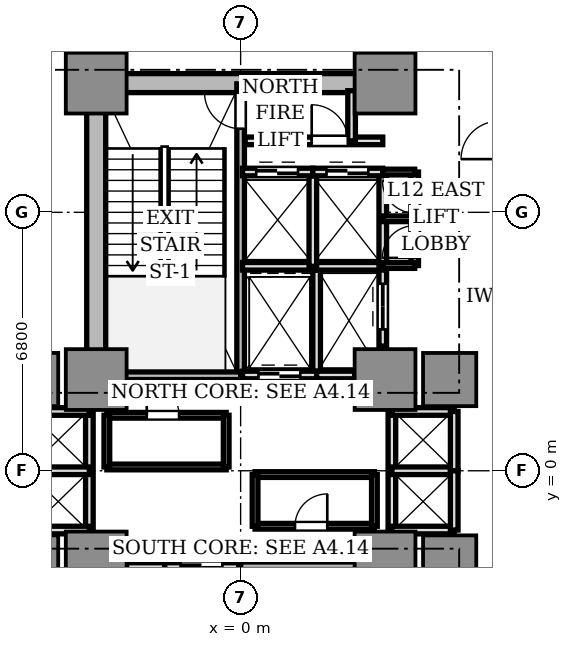
"""IFC4 building model, lengths in metres.
Left out: names, types, materials, properties, quantities, classifications, styles, units other than length and angle.
Written with IfcOpenShell. Run it as: python <this file> out.ifc"""

import sys

from ifc_helpers import new_model, si_unit, direction, frame, frame_2d, origin, origin_2d, place, context, subcontext, project, spatial, rectangle, extrude, source, transform, mapped, element, fill, save


model = new_model("IFC4")
c1 = context("Model", 3, precision=1e-05, world=origin(), true_north=direction((0.0, 1.0)))
c2 = subcontext(c1, "Body", "Model", "MODEL_VIEW")
j1 = project(units=[si_unit("LENGTHUNIT", "METRE"), si_unit("PLANEANGLEUNIT", "RADIAN")], contexts=[c1])
p1 = place(None, origin())
s1 = spatial("IfcSite", under=j1, at=p1, CompositionType="ELEMENT")
p2 = place(p1, origin())
s2 = spatial("IfcBuilding", under=s1, at=p2, CompositionType="ELEMENT")
p3 = place(p2, frame((0.0, 0.0, 46.55)))
s3 = spatial("IfcBuildingStorey", under=s2, at=p3, CompositionType="ELEMENT", Elevation=46.55)
p4 = place(p3, frame((-3.55, 10.2, 0.0), z_axis=(0.0, 0.0, 1.0), x_axis=(1.0, 0.0, 0.0)))
e1 = element("IfcWall", 1, at=p4, inside=s3, PredefinedType="SHEAR", context=c2, shape_type="SweptSolid", body=[
    extrude(rectangle(XDim=7.1, YDim=0.5, at=frame_2d((3.55, 0.0))), origin(), (0.0, 0.0, 1.0), 4.26),
])
p5 = place(p3, frame((-3.8, 2.85, 0.0), z_axis=(0.0, 0.0, 1.0), x_axis=(0.0, 1.0, 0.0)))
e2 = element("IfcWall", 2, at=p5, inside=s3, PredefinedType="SHEAR", context=c2, shape_type="SweptSolid", body=[
    extrude(rectangle(XDim=6.9, YDim=0.5, at=frame_2d((3.45, 0.0))), origin(), (0.0, 0.0, 1.0), 4.26),
])
m1 = source(origin(), c2, "Body", "SweptSolid", [
    extrude(rectangle(XDim=1.6, YDim=1.6, at=origin_2d()), origin(), (0.0, 0.0, 1.0), 4.26),
])
for number, where, z_axis, x_axis in (
    (3, (-3.8, 2.4, 0.0), (0.0, 0.0, 1.0), (1.0, 0.0, 0.0)),
    (4, (3.8, 2.4, 0.0), (0.0, 0.0, 1.0), (1.0, 0.0, 0.0)),
    (5, (-3.8, 10.2, 0.0), (0.0, 0.0, 1.0), (1.0, 0.0, 0.0)),
    (6, (3.8, 10.2, 0.0), (0.0, 0.0, 1.0), (1.0, 0.0, 0.0)),
    (7, (-3.8, -2.4, 0.0), (0.0, 0.0, 1.0), (1.0, 0.0, 0.0)),
    (8, (3.8, -2.4, 0.0), (0.0, 0.0, 1.0), (1.0, 0.0, 0.0)),
):
    element("IfcColumn", number, at=place(p3, frame(where, z_axis=z_axis, x_axis=x_axis)), inside=s3, PredefinedType="COLUMN", context=c2, shape_type="MappedRepresentation", body=[
        mapped(m1, transform((0.0, 0.0, 0.0), scale=1.0)),
    ])
m2 = source(origin(), c2, "Body", "SweptSolid", [
    extrude(rectangle(XDim=1.4, YDim=1.4, at=origin_2d()), origin(), (0.0, 0.0, 1.0), 4.26),
])
for number, where, z_axis, x_axis in (
    (9, (5.5, 2.4, 0.0), (0.0, 0.0, 1.0), (1.0, 0.0, 0.0)),
    (10, (-5.5, 2.4, 0.0), (0.0, 0.0, 1.0), (1.0, 0.0, 0.0)),
    (11, (5.5, -2.4, 0.0), (0.0, 0.0, 1.0), (1.0, 0.0, 0.0)),
    (12, (-5.5, -2.4, 0.0), (0.0, 0.0, 1.0), (1.0, 0.0, 0.0)),
):
    element("IfcColumn", number, at=place(p3, frame(where, z_axis=z_axis, x_axis=x_axis)), inside=s3, PredefinedType="COLUMN", context=c2, shape_type="MappedRepresentation", body=[
        mapped(m2, transform((0.0, 0.0, 0.0), scale=1.0)),
    ])
p6 = place(p3, frame((0.0, 2.5, 0.0), z_axis=(0.0, 0.0, 1.0), x_axis=(0.0, 1.0, 0.0)))
e13 = element("IfcWall", 13, at=p6, inside=s3, PredefinedType="SOLIDWALL", context=c2, shape_type="SweptSolid", body=[
    extrude(rectangle(XDim=7.68, YDim=0.2, at=frame_2d((3.84, 0.0))), origin(), (0.0, 0.0, 1.0), 4.26),
])
p7 = place(p6, frame((6.5, 0.0, 0.0)))
e14 = element("IfcOpeningElement", 14, at=p7, cuts=e13, PredefinedType="OPENING", context=c2, shape_type="SweptSolid", body=[
    extrude(rectangle(XDim=0.95, YDim=2.15, at=frame_2d((0.475, 1.075))), frame((0.0, 0.11, 0.0), z_axis=(0.0, -1.0, 0.0), x_axis=(1.0, 0.0, 0.0)), (0.0, 0.0, 1.0), 0.22),
])
p8 = place(p3, frame((-3.72, 2.5, 0.0), z_axis=(0.0, 0.0, 1.0), x_axis=(1.0, 0.0, 0.0)))
e15 = element("IfcWall", 15, at=p8, inside=s3, PredefinedType="SOLIDWALL", context=c2, shape_type="SweptSolid", body=[
    extrude(rectangle(XDim=3.72, YDim=0.2, at=frame_2d((1.86, 0.0))), origin(), (0.0, 0.0, 1.0), 4.26),
])
p9 = place(p3, frame((0.0, -10.18, 0.0), z_axis=(0.0, 0.0, 1.0), x_axis=(0.0, 1.0, 0.0)))
e16 = element("IfcWall", 16, at=p9, inside=s3, PredefinedType="SOLIDWALL", context=c2, shape_type="SweptSolid", body=[
    extrude(rectangle(XDim=7.68, YDim=0.2, at=frame_2d((3.84, 0.0))), origin(), (0.0, 0.0, 1.0), 4.26),
])
p10 = place(p9, frame((0.28, 0.0, 0.0)))
e17 = element("IfcOpeningElement", 17, at=p10, cuts=e16, PredefinedType="OPENING", context=c2, shape_type="SweptSolid", body=[
    extrude(rectangle(XDim=1.1, YDim=2.15, at=frame_2d((0.55, 1.075))), frame((0.0, 0.11, 0.0), z_axis=(0.0, -1.0, 0.0), x_axis=(1.0, 0.0, 0.0)), (0.0, 0.0, 1.0), 0.22),
])
p11 = place(p3, frame((0.0, -2.5, 0.0), z_axis=(0.0, 0.0, 1.0), x_axis=(1.0, 0.0, 0.0)))
e18 = element("IfcWall", 18, at=p11, inside=s3, PredefinedType="SOLIDWALL", context=c2, shape_type="SweptSolid", body=[
    extrude(rectangle(XDim=3.72, YDim=0.2, at=frame_2d((1.86, 0.0))), origin(), (0.0, 0.0, 1.0), 4.26),
])
p12 = place(p3, frame((2.0, 2.5, 0.0), z_axis=(0.0, 0.0, 1.0), x_axis=(0.0, 1.0, 0.0)))
e19 = element("IfcWall", 19, at=p12, inside=s3, PredefinedType="SOLIDWALL", context=c2, shape_type="SweptSolid", body=[
    extrude(rectangle(XDim=2.78, YDim=0.2, at=frame_2d((1.39, 0.0))), origin(), (0.0, 0.0, 1.0), 3.81),
])
p13 = place(p3, frame((0.05, 2.52, 0.0), z_axis=(0.0, 0.0, 1.0), x_axis=(1.0, 0.0, 0.0)))
e20 = element("IfcWall", 20, at=p13, inside=s3, PredefinedType="SOLIDWALL", context=c2, shape_type="SweptSolid", body=[
    extrude(rectangle(XDim=1.95, YDim=0.2, at=frame_2d((0.975, 0.0))), origin(), (0.0, 0.0, 1.0), 3.81),
])
p14 = place(p13, frame((0.42, 0.0, 0.0)))
e21 = element("IfcOpeningElement", 21, at=p14, cuts=e20, PredefinedType="OPENING", context=c2, shape_type="SweptSolid", body=[
    extrude(rectangle(XDim=1.1, YDim=2.2, at=frame_2d((0.55, 1.1))), frame((0.0, 0.11, 0.0), z_axis=(0.0, -1.0, 0.0), x_axis=(1.0, 0.0, 0.0)), (0.0, 0.0, 1.0), 0.22),
])
p15 = place(p3, frame((-2.0, -5.28, 0.0), z_axis=(0.0, 0.0, 1.0), x_axis=(0.0, 1.0, 0.0)))
e22 = element("IfcWall", 22, at=p15, inside=s3, PredefinedType="SOLIDWALL", context=c2, shape_type="SweptSolid", body=[
    extrude(rectangle(XDim=2.78, YDim=0.2, at=frame_2d((1.39, 0.0))), origin(), (0.0, 0.0, 1.0), 3.81),
])
p16 = place(p3, frame((-2.0, -2.52, 0.0), z_axis=(0.0, 0.0, 1.0), x_axis=(1.0, 0.0, 0.0)))
e23 = element("IfcWall", 23, at=p16, inside=s3, PredefinedType="SOLIDWALL", context=c2, shape_type="SweptSolid", body=[
    extrude(rectangle(XDim=1.95, YDim=0.2, at=frame_2d((0.975, 0.0))), origin(), (0.0, 0.0, 1.0), 3.81),
])
p17 = place(p16, frame((0.42, 0.0, 0.0)))
e24 = element("IfcOpeningElement", 24, at=p17, cuts=e23, PredefinedType="OPENING", context=c2, shape_type="SweptSolid", body=[
    extrude(rectangle(XDim=1.1, YDim=2.2, at=frame_2d((0.55, 1.1))), frame((0.0, 0.11, 0.0), z_axis=(0.0, -1.0, 0.0), x_axis=(1.0, 0.0, 0.0)), (0.0, 0.0, 1.0), 0.22),
])
p18 = place(p3, frame((2.0, 2.52, 0.0), z_axis=(0.0, 0.0, 1.0), x_axis=(1.0, 0.0, 0.0)))
e25 = element("IfcWall", 25, at=p18, inside=s3, PredefinedType="SOLIDWALL", context=c2, shape_type="SweptSolid", body=[
    extrude(rectangle(XDim=1.0, YDim=0.2, at=frame_2d((0.5, 0.0))), origin(), (0.0, 0.0, 1.0), 3.81),
])
p19 = place(p3, frame((3.74, 3.28, 0.0), z_axis=(0.0, 0.0, 1.0), x_axis=(0.0, 1.0, 0.0)))
e26 = element("IfcWall", 26, at=p19, inside=s3, PredefinedType="SOLIDWALL", context=c2, shape_type="SweptSolid", body=[
    extrude(rectangle(XDim=2.08, YDim=0.2, at=frame_2d((1.04, 0.0))), origin(), (0.0, 0.0, 1.0), 3.81),
])
p20 = place(p19, frame((0.44, 0.0, 0.0)))
e27 = element("IfcOpeningElement", 27, at=p20, cuts=e26, PredefinedType="OPENING", context=c2, shape_type="SweptSolid", body=[
    extrude(rectangle(XDim=1.2, YDim=2.2, at=frame_2d((0.6, 1.1))), frame((0.0, 0.11, 0.0), z_axis=(0.0, -1.0, 0.0), x_axis=(1.0, 0.0, 0.0)), (0.0, 0.0, 1.0), 0.22),
])
p21 = place(p3, frame((-3.0, -2.52, 0.0), z_axis=(0.0, 0.0, 1.0), x_axis=(1.0, 0.0, 0.0)))
e28 = element("IfcWall", 28, at=p21, inside=s3, PredefinedType="SOLIDWALL", context=c2, shape_type="SweptSolid", body=[
    extrude(rectangle(XDim=1.0, YDim=0.2, at=frame_2d((0.5, 0.0))), origin(), (0.0, 0.0, 1.0), 3.81),
])
p22 = place(p3, frame((0.05, 5.38, 0.0), z_axis=(0.0, 0.0, 1.0), x_axis=(1.0, 0.0, 0.0)))
e29 = element("IfcWall", 29, at=p22, inside=s3, PredefinedType="SOLIDWALL", context=c2, shape_type="SweptSolid", body=[
    extrude(rectangle(XDim=3.69, YDim=0.2, at=frame_2d((1.845, 0.0))), origin(), (0.0, 0.0, 1.0), 3.81),
])
p23 = place(p3, frame((1.9, 5.38, 0.0), z_axis=(0.0, 0.0, 1.0), x_axis=(0.0, 1.0, 0.0)))
e30 = element("IfcWall", 30, at=p23, inside=s3, PredefinedType="SOLIDWALL", context=c2, shape_type="SweptSolid", body=[
    extrude(rectangle(XDim=2.48, YDim=0.2, at=frame_2d((1.24, 0.0))), origin(), (0.0, 0.0, 1.0), 3.81),
])
p24 = place(p3, frame((0.05, 7.86, 0.0), z_axis=(0.0, 0.0, 1.0), x_axis=(1.0, 0.0, 0.0)))
e31 = element("IfcWall", 31, at=p24, inside=s3, PredefinedType="SOLIDWALL", context=c2, shape_type="SweptSolid", body=[
    extrude(rectangle(XDim=1.85, YDim=0.2, at=frame_2d((0.925, 0.0))), origin(), (0.0, 0.0, 1.0), 3.81),
])
p25 = place(p24, frame((0.36, 0.0, 0.0)))
e32 = element("IfcOpeningElement", 32, at=p25, cuts=e31, PredefinedType="OPENING", context=c2, shape_type="SweptSolid", body=[
    extrude(rectangle(XDim=1.1, YDim=2.2, at=frame_2d((0.55, 1.1))), frame((0.0, 0.11, 0.0), z_axis=(0.0, -1.0, 0.0), x_axis=(1.0, 0.0, 0.0)), (0.0, 0.0, 1.0), 0.22),
])
p26 = place(p3, frame((3.74, 5.38, 0.0), z_axis=(0.0, 0.0, 1.0), x_axis=(0.0, 1.0, 0.0)))
e33 = element("IfcWall", 33, at=p26, inside=s3, PredefinedType="SOLIDWALL", context=c2, shape_type="SweptSolid", body=[
    extrude(rectangle(XDim=2.48, YDim=0.2, at=frame_2d((1.24, 0.0))), origin(), (0.0, 0.0, 1.0), 3.81),
])
p27 = place(p3, frame((1.9, 7.86, 0.0), z_axis=(0.0, 0.0, 1.0), x_axis=(1.0, 0.0, 0.0)))
e34 = element("IfcWall", 34, at=p27, inside=s3, PredefinedType="SOLIDWALL", context=c2, shape_type="SweptSolid", body=[
    extrude(rectangle(XDim=1.84, YDim=0.2, at=frame_2d((0.92, 0.0))), origin(), (0.0, 0.0, 1.0), 3.81),
])
p28 = place(p27, frame((0.36, 0.0, 0.0)))
e35 = element("IfcOpeningElement", 35, at=p28, cuts=e34, PredefinedType="OPENING", context=c2, shape_type="SweptSolid", body=[
    extrude(rectangle(XDim=1.1, YDim=2.2, at=frame_2d((0.55, 1.1))), frame((0.0, 0.11, 0.0), z_axis=(0.0, -1.0, 0.0), x_axis=(1.0, 0.0, 0.0)), (0.0, 0.0, 1.0), 0.22),
])
p29 = place(p3, frame((3.98, -1.56, 0.0), z_axis=(0.0, 0.0, 1.0), x_axis=(0.0, 1.0, 0.0)))
e36 = element("IfcWall", 36, at=p29, inside=s3, PredefinedType="SOLIDWALL", context=c2, shape_type="SweptSolid", body=[
    extrude(rectangle(XDim=3.12, YDim=0.2, at=frame_2d((1.56, 0.0))), origin(), (0.0, 0.0, 1.0), 3.33),
])
for number, where, z_axis, x_axis in (
    (37, (3.98, 1.56, 0.0), (0.0, 0.0, 1.0), (1.0, 0.0, 0.0)),
    (38, (3.98, -1.56, 0.0), (0.0, 0.0, 1.0), (1.0, 0.0, 0.0)),
    (39, (3.98, 0.0, 0.0), (0.0, 0.0, 1.0), (1.0, 0.0, 0.0)),
):
    element("IfcWall", number, at=place(p3, frame(where, z_axis=z_axis, x_axis=x_axis)), inside=s3, PredefinedType="SOLIDWALL", context=c2, shape_type="SweptSolid", body=[
        extrude(rectangle(XDim=1.64, YDim=0.2, at=frame_2d((0.82, 0.0))), origin(), (0.0, 0.0, 1.0), 3.81),
    ])
for number, where, z_axis, x_axis in (
    (40, (5.62, 0.0, 0.0), (0.0, 0.0, 1.0), (0.0, 1.0, 0.0)),
    (41, (5.62, -1.56, 0.0), (0.0, 0.0, 1.0), (0.0, 1.0, 0.0)),
):
    element("IfcWall", number, at=place(p3, frame(where, z_axis=z_axis, x_axis=x_axis)), inside=s3, PredefinedType="SOLIDWALL", context=c2, shape_type="SweptSolid", body=[
        extrude(rectangle(XDim=1.56, YDim=0.2, at=frame_2d((0.78, 0.0))), origin(), (0.0, 0.0, 1.0), 3.81),
    ])
p30 = place(p3, frame((-3.98, -1.56, 0.0), z_axis=(0.0, 0.0, 1.0), x_axis=(0.0, 1.0, 0.0)))
e42 = element("IfcWall", 42, at=p30, inside=s3, PredefinedType="SOLIDWALL", context=c2, shape_type="SweptSolid", body=[
    extrude(rectangle(XDim=3.12, YDim=0.2, at=frame_2d((1.56, 0.0))), origin(), (0.0, 0.0, 1.0), 3.33),
])
for number, where, z_axis, x_axis in (
    (43, (-5.62, 1.56, 0.0), (0.0, 0.0, 1.0), (1.0, 0.0, 0.0)),
    (44, (-5.62, -1.56, 0.0), (0.0, 0.0, 1.0), (1.0, 0.0, 0.0)),
    (45, (-5.62, 0.0, 0.0), (0.0, 0.0, 1.0), (1.0, 0.0, 0.0)),
):
    element("IfcWall", number, at=place(p3, frame(where, z_axis=z_axis, x_axis=x_axis)), inside=s3, PredefinedType="SOLIDWALL", context=c2, shape_type="SweptSolid", body=[
        extrude(rectangle(XDim=1.64, YDim=0.2, at=frame_2d((0.82, 0.0))), origin(), (0.0, 0.0, 1.0), 3.81),
    ])
p31 = place(p3, frame((0.12, 8.68, 0.0), z_axis=(0.0, 0.0, 1.0), x_axis=(1.0, 0.0, 0.0)))
e46 = element("IfcWall", 46, at=p31, inside=s3, PredefinedType="SOLIDWALL", context=c2, shape_type="SweptSolid", body=[
    extrude(rectangle(XDim=3.62, YDim=0.2, at=frame_2d((1.81, 0.0))), origin(), (0.0, 0.0, 1.0), 3.81),
])
p32 = place(p31, frame((1.75, 0.0, 0.0)))
e47 = element("IfcOpeningElement", 47, at=p32, cuts=e46, PredefinedType="OPENING", context=c2, shape_type="SweptSolid", body=[
    extrude(rectangle(XDim=0.95, YDim=2.15, at=frame_2d((0.475, 1.075))), frame((0.0, 0.11, 0.0), z_axis=(0.0, -1.0, 0.0), x_axis=(1.0, 0.0, 0.0)), (0.0, 0.0, 1.0), 0.22),
])
p33 = place(p3, frame((2.92, 8.68, 0.0), z_axis=(0.0, 0.0, 1.0), x_axis=(0.0, 1.0, 0.0)))
e48 = element("IfcWall", 48, at=p33, inside=s3, PredefinedType="SOLIDWALL", context=c2, shape_type="SweptSolid", body=[
    extrude(rectangle(XDim=1.32, YDim=0.2, at=frame_2d((0.66, 0.0))), origin(), (0.0, 0.0, 1.0), 3.81),
])
p34 = place(p3, frame((4.58, 5.4, 0.0), z_axis=(0.0, 0.0, 1.0), x_axis=(0.0, 1.0, 0.0)))
e49 = element("IfcWall", 49, at=p34, inside=s3, PredefinedType="SOLIDWALL", context=c2, shape_type="SweptSolid", body=[
    extrude(rectangle(XDim=2.46, YDim=0.2, at=frame_2d((1.23, 0.0))), origin(), (0.0, 0.0, 1.0), 3.81),
])
p35 = place(p34, frame((0.2, 0.0, 0.0)))
e50 = element("IfcOpeningElement", 50, at=p35, cuts=e49, PredefinedType="OPENING", context=c2, shape_type="SweptSolid", body=[
    extrude(rectangle(XDim=0.85, YDim=2.1, at=frame_2d((0.425, 1.05))), frame((0.0, 0.11, 0.0), z_axis=(0.0, -1.0, 0.0), x_axis=(1.0, 0.0, 0.0)), (0.0, 0.0, 1.0), 0.22),
])
p36 = place(p34, frame((1.38, 0.0, 0.0)))
e51 = element("IfcOpeningElement", 51, at=p36, cuts=e49, PredefinedType="OPENING", context=c2, shape_type="SweptSolid", body=[
    extrude(rectangle(XDim=0.85, YDim=2.1, at=frame_2d((0.425, 1.05))), frame((0.0, 0.11, 0.0), z_axis=(0.0, -1.0, 0.0), x_axis=(1.0, 0.0, 0.0)), (0.0, 0.0, 1.0), 0.22),
])
for number, where, z_axis, x_axis in (
    (52, (3.74, 5.4, 0.0), (0.0, 0.0, 1.0), (1.0, 0.0, 0.0)),
    (53, (3.74, 7.86, 0.0), (0.0, 0.0, 1.0), (1.0, 0.0, 0.0)),
    (54, (3.74, 6.63, 0.0), (0.0, 0.0, 1.0), (1.0, 0.0, 0.0)),
):
    element("IfcWall", number, at=place(p3, frame(where, z_axis=z_axis, x_axis=x_axis)), inside=s3, PredefinedType="PARTITIONING", context=c2, shape_type="SweptSolid", body=[
        extrude(rectangle(XDim=0.84, YDim=0.15, at=frame_2d((0.42, 0.0))), origin(), (0.0, 0.0, 1.0), 3.81),
    ])
p37 = place(p3, frame((-3.52, 0.1, 0.0), z_axis=(0.0, 0.0, 1.0), x_axis=(1.0, 0.0, 0.0)))
e55 = element("IfcWall", 55, at=p37, inside=s3, PredefinedType="PARTITIONING", context=c2, shape_type="SweptSolid", body=[
    extrude(rectangle(XDim=3.14, YDim=0.15, at=frame_2d((1.57, 0.0))), origin(), (0.0, 0.0, 1.0), 3.81),
])
p38 = place(p3, frame((-3.52, 1.46, 0.0), z_axis=(0.0, 0.0, 1.0), x_axis=(1.0, 0.0, 0.0)))
e56 = element("IfcWall", 56, at=p38, inside=s3, PredefinedType="PARTITIONING", context=c2, shape_type="SweptSolid", body=[
    extrude(rectangle(XDim=3.14, YDim=0.15, at=frame_2d((1.57, 0.0))), origin(), (0.0, 0.0, 1.0), 3.81),
])
p39 = place(p38, frame((1.05, 0.0, 0.0)))
e57 = element("IfcOpeningElement", 57, at=p39, cuts=e56, PredefinedType="OPENING", context=c2, shape_type="SweptSolid", body=[
    extrude(rectangle(XDim=0.85, YDim=2.1, at=frame_2d((0.425, 1.05))), frame((0.0, 0.085, 0.0), z_axis=(0.0, -1.0, 0.0), x_axis=(1.0, 0.0, 0.0)), (0.0, 0.0, 1.0), 0.17),
])
p40 = place(p3, frame((-3.52, 0.1, 0.0), z_axis=(0.0, 0.0, 1.0), x_axis=(0.0, 1.0, 0.0)))
e58 = element("IfcWall", 58, at=p40, inside=s3, PredefinedType="PARTITIONING", context=c2, shape_type="SweptSolid", body=[
    extrude(rectangle(XDim=1.36, YDim=0.15, at=frame_2d((0.68, 0.0))), origin(), (0.0, 0.0, 1.0), 3.33),
])
p41 = place(p3, frame((-0.38, 0.1, 0.0), z_axis=(0.0, 0.0, 1.0), x_axis=(0.0, 1.0, 0.0)))
e59 = element("IfcWall", 59, at=p41, inside=s3, PredefinedType="PARTITIONING", context=c2, shape_type="SweptSolid", body=[
    extrude(rectangle(XDim=1.36, YDim=0.15, at=frame_2d((0.68, 0.0))), origin(), (0.0, 0.0, 1.0), 3.81),
])
p42 = place(p3, frame((0.38, -0.1, 0.0), z_axis=(0.0, 0.0, 1.0), x_axis=(1.0, 0.0, 0.0)))
e60 = element("IfcWall", 60, at=p42, inside=s3, PredefinedType="PARTITIONING", context=c2, shape_type="SweptSolid", body=[
    extrude(rectangle(XDim=3.14, YDim=0.15, at=frame_2d((1.57, 0.0))), origin(), (0.0, 0.0, 1.0), 3.81),
])
p43 = place(p3, frame((0.38, -1.46, 0.0), z_axis=(0.0, 0.0, 1.0), x_axis=(1.0, 0.0, 0.0)))
e61 = element("IfcWall", 61, at=p43, inside=s3, PredefinedType="PARTITIONING", context=c2, shape_type="SweptSolid", body=[
    extrude(rectangle(XDim=3.14, YDim=0.15, at=frame_2d((1.57, 0.0))), origin(), (0.0, 0.0, 1.0), 3.81),
])
p44 = place(p43, frame((1.05, 0.0, 0.0)))
e62 = element("IfcOpeningElement", 62, at=p44, cuts=e61, PredefinedType="OPENING", context=c2, shape_type="SweptSolid", body=[
    extrude(rectangle(XDim=0.85, YDim=2.1, at=frame_2d((0.425, 1.05))), frame((0.0, 0.085, 0.0), z_axis=(0.0, -1.0, 0.0), x_axis=(1.0, 0.0, 0.0)), (0.0, 0.0, 1.0), 0.17),
])
p45 = place(p3, frame((0.38, -1.46, 0.0), z_axis=(0.0, 0.0, 1.0), x_axis=(0.0, 1.0, 0.0)))
e63 = element("IfcWall", 63, at=p45, inside=s3, PredefinedType="PARTITIONING", context=c2, shape_type="SweptSolid", body=[
    extrude(rectangle(XDim=1.36, YDim=0.15, at=frame_2d((0.68, 0.0))), origin(), (0.0, 0.0, 1.0), 3.81),
])
p46 = place(p3, frame((3.52, -1.46, 0.0), z_axis=(0.0, 0.0, 1.0), x_axis=(0.0, 1.0, 0.0)))
e64 = element("IfcWall", 64, at=p46, inside=s3, PredefinedType="PARTITIONING", context=c2, shape_type="SweptSolid", body=[
    extrude(rectangle(XDim=1.36, YDim=0.15, at=frame_2d((0.68, 0.0))), origin(), (0.0, 0.0, 1.0), 3.33),
])
m3 = source(origin(), c2, "Body", "SweptSolid", [
    extrude(rectangle(XDim=1.1, YDim=0.05, at=origin_2d()), origin(), (0.0, 0.0, 1.0), 2.2),
])
p47 = place(p14, frame((0.55, 0.0, 0.0)))
e65 = element("IfcDoor", 65, at=p47, inside=s3, OperationType="DOUBLE_DOOR_SLIDING", PredefinedType="DOOR", context=c2, shape_type="MappedRepresentation", body=[
    mapped(m3, transform((0.0, 0.0, 0.0), scale=1.0)),
])
fill(e21, e65)
p48 = place(p17, frame((0.55, 0.0, 0.0)))
e66 = element("IfcDoor", 66, at=p48, inside=s3, OperationType="DOUBLE_DOOR_SLIDING", PredefinedType="DOOR", context=c2, shape_type="MappedRepresentation", body=[
    mapped(m3, transform((0.0, 0.0, 0.0), scale=1.0)),
])
fill(e24, e66)
m4 = source(origin(), c2, "Body", "SweptSolid", [
    extrude(rectangle(XDim=1.2, YDim=0.05, at=origin_2d()), origin(), (0.0, 0.0, 1.0), 2.2),
])
p49 = place(p20, frame((0.6, 0.0, 0.0)))
e67 = element("IfcDoor", 67, at=p49, inside=s3, OperationType="DOUBLE_DOOR_SLIDING", PredefinedType="DOOR", context=c2, shape_type="MappedRepresentation", body=[
    mapped(m4, transform((0.0, 0.0, 0.0), scale=1.0)),
])
fill(e27, e67)
p50 = place(p25, frame((0.55, 0.0, 0.0)))
e68 = element("IfcDoor", 68, at=p50, inside=s3, OperationType="DOUBLE_DOOR_SLIDING", PredefinedType="DOOR", context=c2, shape_type="MappedRepresentation", body=[
    mapped(m3, transform((0.0, 0.0, 0.0), scale=1.0)),
])
fill(e32, e68)
p51 = place(p28, frame((0.55, 0.0, 0.0)))
e69 = element("IfcDoor", 69, at=p51, inside=s3, OperationType="DOUBLE_DOOR_SLIDING", PredefinedType="DOOR", context=c2, shape_type="MappedRepresentation", body=[
    mapped(m3, transform((0.0, 0.0, 0.0), scale=1.0)),
])
fill(e35, e69)
m5 = source(origin(), c2, "Body", "SweptSolid", [
    extrude(rectangle(XDim=0.95, YDim=0.05, at=origin_2d()), origin(), (0.0, 0.0, 1.0), 2.15),
])
p52 = place(p7, frame((0.475, 0.0, 0.0)))
e70 = element("IfcDoor", 70, at=p52, inside=s3, OperationType="SINGLE_SWING_RIGHT", PredefinedType="DOOR", context=c2, shape_type="MappedRepresentation", body=[
    mapped(m5, transform((0.0, 0.0, 0.0), scale=1.0)),
])
fill(e14, e70)
p53 = place(p32, frame((0.475, 0.0, 0.0)))
e71 = element("IfcDoor", 71, at=p53, inside=s3, OperationType="SINGLE_SWING_LEFT", PredefinedType="DOOR", context=c2, shape_type="MappedRepresentation", body=[
    mapped(m5, transform((0.0, 0.0, 0.0), scale=1.0)),
])
fill(e47, e71)
m6 = source(origin(), c2, "Body", "SweptSolid", [
    extrude(rectangle(XDim=0.85, YDim=0.05, at=origin_2d()), origin(), (0.0, 0.0, 1.0), 2.1),
])
p54 = place(p35, frame((0.425, 0.0, 0.0)))
e72 = element("IfcDoor", 72, at=p54, inside=s3, OperationType="SINGLE_SWING_LEFT", PredefinedType="DOOR", context=c2, shape_type="MappedRepresentation", body=[
    mapped(m6, transform((0.0, 0.0, 0.0), scale=1.0)),
])
fill(e50, e72)
p55 = place(p36, frame((0.425, 0.0, 0.0)))
e73 = element("IfcDoor", 73, at=p55, inside=s3, OperationType="SINGLE_SWING_RIGHT", PredefinedType="DOOR", context=c2, shape_type="MappedRepresentation", body=[
    mapped(m6, transform((0.0, 0.0, 0.0), scale=1.0)),
])
fill(e51, e73)
p56 = place(p39, frame((0.425, 0.0, 0.0)))
e74 = element("IfcDoor", 74, at=p56, inside=s3, OperationType="SINGLE_SWING_LEFT", PredefinedType="DOOR", context=c2, shape_type="MappedRepresentation", body=[
    mapped(m6, transform((0.0, 0.0, 0.0), scale=1.0)),
])
fill(e57, e74)
p57 = place(p44, frame((0.425, 0.0, 0.0)))
e75 = element("IfcDoor", 75, at=p57, inside=s3, OperationType="SINGLE_SWING_RIGHT", PredefinedType="DOOR", context=c2, shape_type="MappedRepresentation", body=[
    mapped(m6, transform((0.0, 0.0, 0.0), scale=1.0)),
])
fill(e62, e75)
save(model, sys.argv[1])
